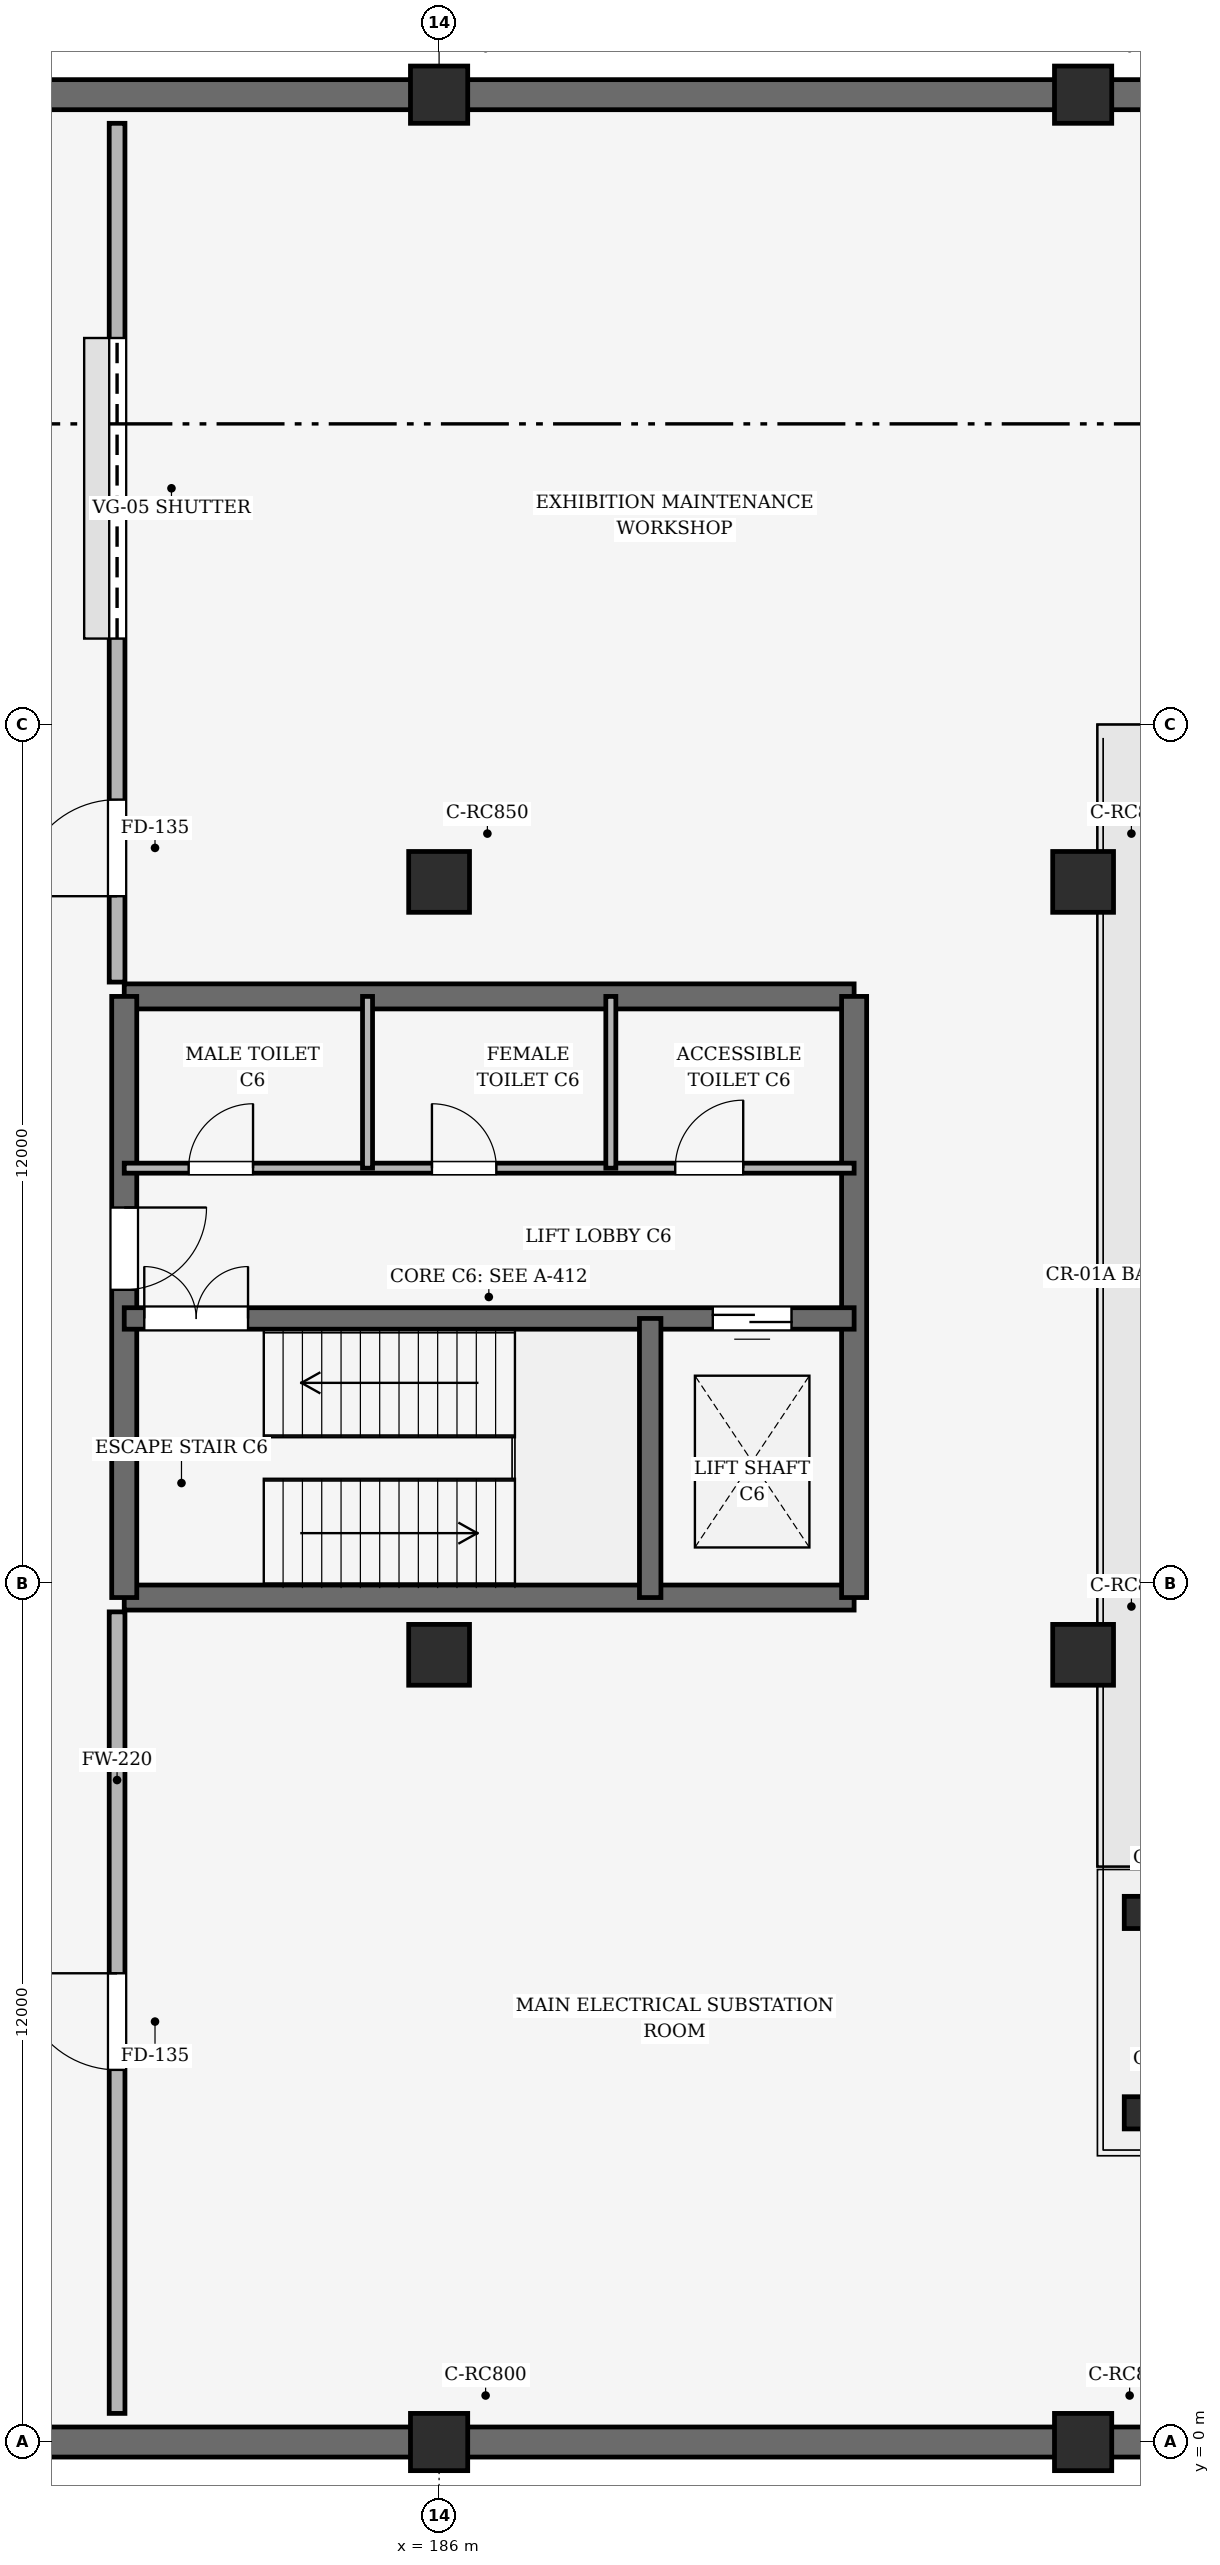
"""IFC4 building model, lengths in metres.
Left out: names, types, materials, properties, quantities, classifications, styles, units other than length and angle.
Written with IfcOpenShell. Run it as: python <this file> out.ifc"""

import sys

from ifc_helpers import new_model, si_unit, direction, frame, frame_2d, origin, origin_2d, place, context, subcontext, project, spatial, rectangle, extrude, element, fill, save


model = new_model("IFC4")
c1 = context("Model", 3, precision=1e-05, world=origin(), true_north=direction((0.0, 1.0)))
c2 = subcontext(c1, "Body", "Model", "MODEL_VIEW")
j1 = project(units=[si_unit("LENGTHUNIT", "METRE"), si_unit("PLANEANGLEUNIT", "RADIAN")], contexts=[c1])
p1 = place(None, origin())
s1 = spatial("IfcSite", under=j1, at=p1, CompositionType="ELEMENT")
p2 = place(p1, origin())
s2 = spatial("IfcBuilding", under=s1, at=p2, CompositionType="ELEMENT")
p3 = place(p2, frame((0.0, 0.0, -4.8)))
s3 = spatial("IfcBuildingStorey", under=s2, at=p3, CompositionType="ELEMENT", Elevation=-4.8)
p4 = place(p3, frame((186.0, 0.0, -0.45), z_axis=(0.0, 0.0, 1.0), x_axis=(1.0, 0.0, 0.0)))
e1 = element("IfcColumn", 1, at=p4, inside=s3, PredefinedType="COLUMN", context=c2, shape_type="SweptSolid", body=[
    extrude(rectangle(XDim=0.8, YDim=0.8, at=origin_2d()), origin(), (0.0, 0.0, 1.0), 5.25),
])
for number, where, z_axis, x_axis in (
    (2, (186.0, 11.0, -0.45), (0.0, 0.0, 1.0), (1.0, 0.0, 0.0)),
    (3, (186.0, 21.8, -0.45), (0.0, 0.0, 1.0), (1.0, 0.0, 0.0)),
):
    element("IfcColumn", number, at=place(p3, frame(where, z_axis=z_axis, x_axis=x_axis)), inside=s3, PredefinedType="COLUMN", context=c2, shape_type="SweptSolid", body=[
        extrude(rectangle(XDim=0.85, YDim=0.85, at=origin_2d()), origin(), (0.0, 0.0, 1.0), 5.25),
    ])
for number, where, z_axis, x_axis in (
    (4, (186.0, 32.8, -0.45), (0.0, 0.0, 1.0), (1.0, 0.0, 0.0)),
    (5, (195.0, 0.0, -0.45), (0.0, 0.0, 1.0), (1.0, 0.0, 0.0)),
):
    element("IfcColumn", number, at=place(p3, frame(where, z_axis=z_axis, x_axis=x_axis)), inside=s3, PredefinedType="COLUMN", context=c2, shape_type="SweptSolid", body=[
        extrude(rectangle(XDim=0.8, YDim=0.8, at=origin_2d()), origin(), (0.0, 0.0, 1.0), 5.25),
    ])
for number, where, z_axis, x_axis in (
    (6, (195.0, 11.0, -0.45), (0.0, 0.0, 1.0), (1.0, 0.0, 0.0)),
    (7, (195.0, 21.8, -0.45), (0.0, 0.0, 1.0), (1.0, 0.0, 0.0)),
):
    element("IfcColumn", number, at=place(p3, frame(where, z_axis=z_axis, x_axis=x_axis)), inside=s3, PredefinedType="COLUMN", context=c2, shape_type="SweptSolid", body=[
        extrude(rectangle(XDim=0.85, YDim=0.85, at=origin_2d()), origin(), (0.0, 0.0, 1.0), 5.25),
    ])
p5 = place(p3, frame((195.0, 32.8, -0.45), z_axis=(0.0, 0.0, 1.0), x_axis=(1.0, 0.0, 0.0)))
e8 = element("IfcColumn", 8, at=p5, inside=s3, PredefinedType="COLUMN", context=c2, shape_type="SweptSolid", body=[
    extrude(rectangle(XDim=0.8, YDim=0.8, at=origin_2d()), origin(), (0.0, 0.0, 1.0), 5.25),
])
for number, where, z_axis, x_axis in (
    (9, (195.8, 4.6, 0.0), (0.0, 0.0, 1.0), (1.0, 0.0, 0.0)),
    (10, (195.8, 7.4, 0.0), (0.0, 0.0, 1.0), (1.0, 0.0, 0.0)),
):
    element("IfcColumn", number, at=place(p3, frame(where, z_axis=z_axis, x_axis=x_axis)), inside=s3, PredefinedType="COLUMN", context=c2, shape_type="SweptSolid", body=[
        extrude(rectangle(XDim=0.45, YDim=0.45, at=origin_2d()), origin(), (0.0, 0.0, 1.0), 2.072),
    ])
for number, where, z_axis, x_axis in (
    (11, (174.0, 0.0, 0.0), (0.0, 0.0, 1.0), (1.0, 0.0, 0.0)),
    (12, (186.0, 32.8, 0.0), (0.0, 0.0, 1.0), (-1.0, 0.0, 0.0)),
):
    element("IfcWall", number, at=place(p3, frame(where, z_axis=z_axis, x_axis=x_axis)), inside=s3, PredefinedType="STANDARD", context=c2, shape_type="SweptSolid", body=[
        extrude(rectangle(XDim=12.0, YDim=0.42, at=frame_2d((6.0, 0.0))), origin(), (0.0, 0.0, 1.0), 4.54),
    ])
for number, where, z_axis, x_axis in (
    (13, (186.0, 0.0, 0.0), (0.0, 0.0, 1.0), (1.0, 0.0, 0.0)),
    (14, (195.0, 32.8, 0.0), (0.0, 0.0, 1.0), (-1.0, 0.0, 0.0)),
    (15, (195.0, 0.0, 0.0), (0.0, 0.0, 1.0), (1.0, 0.0, 0.0)),
    (16, (204.0, 32.8, 0.0), (0.0, 0.0, 1.0), (-1.0, 0.0, 0.0)),
):
    element("IfcWall", number, at=place(p3, frame(where, z_axis=z_axis, x_axis=x_axis)), inside=s3, PredefinedType="STANDARD", context=c2, shape_type="SweptSolid", body=[
        extrude(rectangle(XDim=9.0, YDim=0.42, at=frame_2d((4.5, 0.0))), origin(), (0.0, 0.0, 1.0), 4.54),
    ])
for number, where, z_axis, x_axis in (
    (17, (181.6, 11.8, 0.0), (0.0, 0.0, 1.0), (1.0, 0.0, 0.0)),
    (18, (191.8, 20.2, 0.0), (0.0, 0.0, 1.0), (-1.0, 0.0, 0.0)),
):
    element("IfcWall", number, at=place(p3, frame(where, z_axis=z_axis, x_axis=x_axis)), inside=s3, PredefinedType="SHEAR", context=c2, shape_type="SweptSolid", body=[
        extrude(rectangle(XDim=10.2, YDim=0.35, at=frame_2d((5.1, 0.0))), origin(), (0.0, 0.0, 1.0), 4.8),
    ])
p6 = place(p3, frame((181.6, 20.2, 0.0), z_axis=(0.0, 0.0, 1.0), x_axis=(0.0, -1.0, 0.0)))
e19 = element("IfcWall", 19, at=p6, inside=s3, PredefinedType="SHEAR", context=c2, shape_type="SweptSolid", body=[
    extrude(rectangle(XDim=8.4, YDim=0.35, at=frame_2d((4.2, 0.0))), origin(), (0.0, 0.0, 1.0), 4.8),
])
p7 = place(p6, frame((2.95, 0.0, 0.0)))
e20 = element("IfcOpeningElement", 20, at=p7, cuts=e19, PredefinedType="OPENING", context=c2, shape_type="SweptSolid", body=[
    extrude(rectangle(XDim=1.15, YDim=2.15, at=frame_2d((0.575, 1.075))), frame((0.0, 0.185, 0.0), z_axis=(0.0, -1.0, 0.0), x_axis=(1.0, 0.0, 0.0)), (0.0, 0.0, 1.0), 0.37),
])
p8 = place(p3, frame((191.8, 11.8, 0.0), z_axis=(0.0, 0.0, 1.0), x_axis=(0.0, 1.0, 0.0)))
e21 = element("IfcWall", 21, at=p8, inside=s3, PredefinedType="SHEAR", context=c2, shape_type="SweptSolid", body=[
    extrude(rectangle(XDim=8.4, YDim=0.35, at=frame_2d((4.2, 0.0))), origin(), (0.0, 0.0, 1.0), 4.8),
])
p9 = place(p3, frame((181.6, 15.7, 0.0), z_axis=(0.0, 0.0, 1.0), x_axis=(1.0, 0.0, 0.0)))
e22 = element("IfcWall", 22, at=p9, inside=s3, PredefinedType="SHEAR", context=c2, shape_type="SweptSolid", body=[
    extrude(rectangle(XDim=10.2, YDim=0.3, at=frame_2d((5.1, 0.0))), origin(), (0.0, 0.0, 1.0), 4.8),
])
p10 = place(p9, frame((0.28, 0.0, 0.0)))
e23 = element("IfcOpeningElement", 23, at=p10, cuts=e22, PredefinedType="OPENING", context=c2, shape_type="SweptSolid", body=[
    extrude(rectangle(XDim=1.45, YDim=2.15, at=frame_2d((0.725, 1.075))), frame((0.0, 0.16, 0.0), z_axis=(0.0, -1.0, 0.0), x_axis=(1.0, 0.0, 0.0)), (0.0, 0.0, 1.0), 0.32),
])
p11 = place(p9, frame((8.225, 0.0, 0.0)))
e24 = element("IfcOpeningElement", 24, at=p11, cuts=e22, PredefinedType="OPENING", context=c2, shape_type="SweptSolid", body=[
    extrude(rectangle(XDim=1.1, YDim=2.15, at=frame_2d((0.55, 1.075))), frame((0.0, 0.16, 0.0), z_axis=(0.0, -1.0, 0.0), x_axis=(1.0, 0.0, 0.0)), (0.0, 0.0, 1.0), 0.32),
])
p12 = place(p3, frame((188.95, 11.8, 0.0), z_axis=(0.0, 0.0, 1.0), x_axis=(0.0, 1.0, 0.0)))
e25 = element("IfcWall", 25, at=p12, inside=s3, PredefinedType="SHEAR", context=c2, shape_type="SweptSolid", body=[
    extrude(rectangle(XDim=3.9, YDim=0.3, at=frame_2d((1.95, 0.0))), origin(), (0.0, 0.0, 1.0), 4.8),
])
p13 = place(p3, frame((181.6, 17.8, 0.0), z_axis=(0.0, 0.0, 1.0), x_axis=(1.0, 0.0, 0.0)))
e26 = element("IfcWall", 26, at=p13, inside=s3, PredefinedType="PARTITIONING", context=c2, shape_type="SweptSolid", body=[
    extrude(rectangle(XDim=10.2, YDim=0.14, at=frame_2d((5.1, 0.0))), origin(), (0.0, 0.0, 1.0), 3.675),
])
p14 = place(p13, frame((0.9, 0.0, 0.0)))
e27 = element("IfcOpeningElement", 27, at=p14, cuts=e26, PredefinedType="OPENING", context=c2, shape_type="SweptSolid", body=[
    extrude(rectangle(XDim=0.9, YDim=2.1, at=frame_2d((0.45, 1.05))), frame((0.0, 0.08, 0.0), z_axis=(0.0, -1.0, 0.0), x_axis=(1.0, 0.0, 0.0)), (0.0, 0.0, 1.0), 0.16),
])
p15 = place(p13, frame((4.3, 0.0, 0.0)))
e28 = element("IfcOpeningElement", 28, at=p15, cuts=e26, PredefinedType="OPENING", context=c2, shape_type="SweptSolid", body=[
    extrude(rectangle(XDim=0.9, YDim=2.1, at=frame_2d((0.45, 1.05))), frame((0.0, 0.08, 0.0), z_axis=(0.0, -1.0, 0.0), x_axis=(1.0, 0.0, 0.0)), (0.0, 0.0, 1.0), 0.16),
])
p16 = place(p13, frame((7.7, 0.0, 0.0)))
e29 = element("IfcOpeningElement", 29, at=p16, cuts=e26, PredefinedType="OPENING", context=c2, shape_type="SweptSolid", body=[
    extrude(rectangle(XDim=0.95, YDim=2.1, at=frame_2d((0.475, 1.05))), frame((0.0, 0.08, 0.0), z_axis=(0.0, -1.0, 0.0), x_axis=(1.0, 0.0, 0.0)), (0.0, 0.0, 1.0), 0.16),
])
for number, where, z_axis, x_axis in (
    (30, (185.0, 17.8, 0.0), (0.0, 0.0, 1.0), (0.0, 1.0, 0.0)),
    (31, (188.4, 17.8, 0.0), (0.0, 0.0, 1.0), (0.0, 1.0, 0.0)),
):
    element("IfcWall", number, at=place(p3, frame(where, z_axis=z_axis, x_axis=x_axis)), inside=s3, PredefinedType="PARTITIONING", context=c2, shape_type="SweptSolid", body=[
        extrude(rectangle(XDim=2.4, YDim=0.14, at=frame_2d((1.2, 0.0))), origin(), (0.0, 0.0, 1.0), 3.9),
    ])
p17 = place(p3, frame((181.5, 0.4, 0.0), z_axis=(0.0, 0.0, 1.0), x_axis=(0.0, 1.0, 0.0)))
e32 = element("IfcWall", 32, at=p17, inside=s3, PredefinedType="SOLIDWALL", context=c2, shape_type="SweptSolid", body=[
    extrude(rectangle(XDim=11.2, YDim=0.22, at=frame_2d((5.6, 0.0))), origin(), (0.0, 0.0, 1.0), 3.6),
])
p18 = place(p17, frame((4.8, 0.0, 0.0)))
e33 = element("IfcOpeningElement", 33, at=p18, cuts=e32, PredefinedType="OPENING", context=c2, shape_type="SweptSolid", body=[
    extrude(rectangle(XDim=1.35, YDim=2.2, at=frame_2d((0.675, 1.1))), frame((0.0, 0.12, 0.0), z_axis=(0.0, -1.0, 0.0), x_axis=(1.0, 0.0, 0.0)), (0.0, 0.0, 1.0), 0.24),
])
p19 = place(p3, frame((181.5, 20.4, 0.0), z_axis=(0.0, 0.0, 1.0), x_axis=(0.0, 1.0, 0.0)))
e34 = element("IfcWall", 34, at=p19, inside=s3, PredefinedType="SOLIDWALL", context=c2, shape_type="SweptSolid", body=[
    extrude(rectangle(XDim=12.0, YDim=0.22, at=frame_2d((6.0, 0.0))), origin(), (0.0, 0.0, 1.0), 3.6),
])
p20 = place(p19, frame((1.2, 0.0, 0.0)))
e35 = element("IfcOpeningElement", 35, at=p20, cuts=e34, PredefinedType="OPENING", context=c2, shape_type="SweptSolid", body=[
    extrude(rectangle(XDim=1.35, YDim=2.2, at=frame_2d((0.675, 1.1))), frame((0.0, 0.12, 0.0), z_axis=(0.0, -1.0, 0.0), x_axis=(1.0, 0.0, 0.0)), (0.0, 0.0, 1.0), 0.24),
])
p21 = place(p19, frame((4.8, 0.0, 0.0)))
e36 = element("IfcOpeningElement", 36, at=p21, cuts=e34, PredefinedType="OPENING", context=c2, shape_type="SweptSolid", body=[
    extrude(rectangle(XDim=4.2, YDim=2.5, at=frame_2d((2.1, 1.25))), frame((0.0, 0.12, 0.0), z_axis=(0.0, -1.0, 0.0), x_axis=(1.0, 0.0, 0.0)), (0.0, 0.0, 1.0), 0.24),
])
p22 = place(p7, origin())
e37 = element("IfcDoor", 37, at=p22, inside=s3, OperationType="SINGLE_SWING_LEFT", PredefinedType="DOOR", context=c2, shape_type="SweptSolid", body=[
    extrude(rectangle(XDim=1.15, YDim=2.15, at=frame_2d((0.575, 1.075))), frame((0.0, 0.025, 0.0), z_axis=(0.0, -1.0, 0.0), x_axis=(1.0, 0.0, 0.0)), (0.0, 0.0, 1.0), 0.05),
])
fill(e20, e37)
p23 = place(p10, origin())
e38 = element("IfcDoor", 38, at=p23, inside=s3, OperationType="DOUBLE_DOOR_SINGLE_SWING", PredefinedType="DOOR", context=c2, shape_type="SweptSolid", body=[
    extrude(rectangle(XDim=1.45, YDim=2.15, at=frame_2d((0.725, 1.075))), frame((0.0, 0.025, 0.0), z_axis=(0.0, -1.0, 0.0), x_axis=(1.0, 0.0, 0.0)), (0.0, 0.0, 1.0), 0.05),
])
fill(e23, e38)
p24 = place(p11, origin())
e39 = element("IfcDoor", 39, at=p24, inside=s3, OperationType="DOUBLE_DOOR_SLIDING", PredefinedType="DOOR", context=c2, shape_type="SweptSolid", body=[
    extrude(rectangle(XDim=1.1, YDim=2.15, at=frame_2d((0.55, 1.075))), frame((0.0, 0.025, 0.0), z_axis=(0.0, -1.0, 0.0), x_axis=(1.0, 0.0, 0.0)), (0.0, 0.0, 1.0), 0.05),
])
fill(e24, e39)
p25 = place(p14, origin())
e40 = element("IfcDoor", 40, at=p25, inside=s3, OperationType="SINGLE_SWING_RIGHT", PredefinedType="DOOR", context=c2, shape_type="SweptSolid", body=[
    extrude(rectangle(XDim=0.9, YDim=2.1, at=frame_2d((0.45, 1.05))), frame((0.0, 0.025, 0.0), z_axis=(0.0, -1.0, 0.0), x_axis=(1.0, 0.0, 0.0)), (0.0, 0.0, 1.0), 0.05),
])
fill(e27, e40)
p26 = place(p15, origin())
e41 = element("IfcDoor", 41, at=p26, inside=s3, OperationType="SINGLE_SWING_LEFT", PredefinedType="DOOR", context=c2, shape_type="SweptSolid", body=[
    extrude(rectangle(XDim=0.9, YDim=2.1, at=frame_2d((0.45, 1.05))), frame((0.0, 0.025, 0.0), z_axis=(0.0, -1.0, 0.0), x_axis=(1.0, 0.0, 0.0)), (0.0, 0.0, 1.0), 0.05),
])
fill(e28, e41)
p27 = place(p16, origin())
e42 = element("IfcDoor", 42, at=p27, inside=s3, OperationType="SINGLE_SWING_RIGHT", PredefinedType="DOOR", context=c2, shape_type="SweptSolid", body=[
    extrude(rectangle(XDim=0.95, YDim=2.1, at=frame_2d((0.475, 1.05))), frame((0.0, 0.025, 0.0), z_axis=(0.0, -1.0, 0.0), x_axis=(1.0, 0.0, 0.0)), (0.0, 0.0, 1.0), 0.05),
])
fill(e29, e42)
p28 = place(p18, origin())
e43 = element("IfcDoor", 43, at=p28, inside=s3, OperationType="SINGLE_SWING_RIGHT", PredefinedType="DOOR", context=c2, shape_type="SweptSolid", body=[
    extrude(rectangle(XDim=1.35, YDim=2.2, at=frame_2d((0.675, 1.1))), frame((0.0, 0.025, 0.0), z_axis=(0.0, -1.0, 0.0), x_axis=(1.0, 0.0, 0.0)), (0.0, 0.0, 1.0), 0.05),
])
fill(e33, e43)
p29 = place(p20, origin())
e44 = element("IfcDoor", 44, at=p29, inside=s3, OperationType="SINGLE_SWING_LEFT", PredefinedType="DOOR", context=c2, shape_type="SweptSolid", body=[
    extrude(rectangle(XDim=1.35, YDim=2.2, at=frame_2d((0.675, 1.1))), frame((0.0, 0.025, 0.0), z_axis=(0.0, -1.0, 0.0), x_axis=(1.0, 0.0, 0.0)), (0.0, 0.0, 1.0), 0.05),
])
fill(e35, e44)
p30 = place(p21, origin())
e45 = element("IfcDoor", 45, at=p30, inside=s3, OperationType="ROLLINGUP", PredefinedType="GATE", context=c2, shape_type="SweptSolid", body=[
    extrude(rectangle(XDim=4.2, YDim=2.5, at=frame_2d((2.1, 1.25))), frame((0.0, 0.025, 0.0), z_axis=(0.0, -1.0, 0.0), x_axis=(1.0, 0.0, 0.0)), (0.0, 0.0, 1.0), 0.05),
])
fill(e36, e45)
save(model, sys.argv[1])
